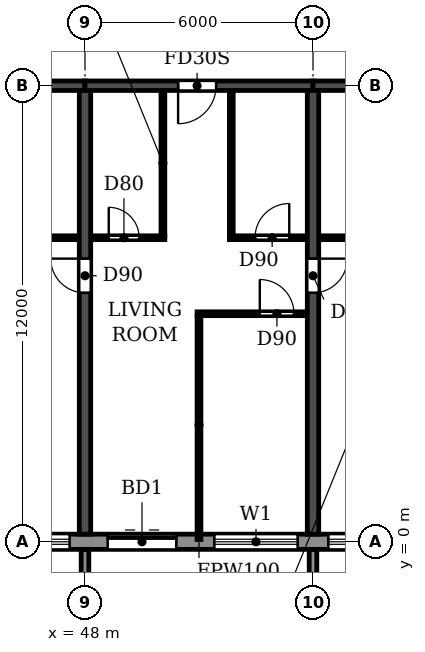
"""IFC4 building model, lengths in metres.
Left out: names, types, materials, properties, quantities, classifications, styles, units other than length and angle.
Written with IfcOpenShell. Run it as: python <this file> out.ifc"""

import sys

from ifc_helpers import new_model, si_unit, direction, frame, frame_2d, origin, place, context, subcontext, project, spatial, polyline, rectangle, outline, extrude, source, transform, mapped, element, fill, save


model = new_model("IFC4")
c1 = context("Model", 3, precision=1e-05, world=origin(), true_north=direction((0.0, 1.0)))
c2 = subcontext(c1, "Body", "Model", "MODEL_VIEW")
j1 = project(units=[si_unit("LENGTHUNIT", "METRE"), si_unit("PLANEANGLEUNIT", "RADIAN")], contexts=[c1])
p1 = place(None, origin())
s1 = spatial("IfcSite", under=j1, at=p1, CompositionType="ELEMENT")
p2 = place(p1, origin())
s2 = spatial("IfcBuilding", under=s1, at=p2, CompositionType="ELEMENT")
p3 = place(p2, frame((0.0, 0.0, 155.4)))
s3 = spatial("IfcBuildingStorey", under=s2, at=p3, CompositionType="ELEMENT", Elevation=155.4)
p4 = place(p3, frame((48.0, 0.2, 0.0), z_axis=(0.0, 0.0, 1.0), x_axis=(0.0, 1.0, 0.0)))
e1 = element("IfcWall", 1, at=p4, inside=s3, PredefinedType="SHEAR", context=c2, shape_type="SweptSolid", body=[
    extrude(rectangle(XDim=11.675, YDim=0.3, at=frame_2d((5.837, 0.0))), origin(), (0.0, 0.0, 1.0), 3.0),
])
p5 = place(p4, frame((6.35, 0.0, 0.0)))
e2 = element("IfcOpeningElement", 2, at=p5, cuts=e1, PredefinedType="OPENING", context=c2, shape_type="SweptSolid", body=[
    extrude(rectangle(XDim=0.9, YDim=2.1, at=frame_2d((0.45, 1.05))), frame((0.0, 0.16, 0.0), z_axis=(0.0, -1.0, 0.0), x_axis=(1.0, 0.0, 0.0)), (0.0, 0.0, 1.0), 0.32),
])
p6 = place(p3, frame((54.0, 0.2, 0.0), z_axis=(0.0, 0.0, 1.0), x_axis=(0.0, 1.0, 0.0)))
e3 = element("IfcWall", 3, at=p6, inside=s3, PredefinedType="SHEAR", context=c2, shape_type="SweptSolid", body=[
    extrude(rectangle(XDim=11.675, YDim=0.3, at=frame_2d((5.837, 0.0))), origin(), (0.0, 0.0, 1.0), 3.0),
])
p7 = place(p6, frame((6.35, 0.0, 0.0)))
e4 = element("IfcOpeningElement", 4, at=p7, cuts=e3, PredefinedType="OPENING", context=c2, shape_type="SweptSolid", body=[
    extrude(rectangle(XDim=0.9, YDim=2.1, at=frame_2d((0.45, 1.05))), frame((0.0, 0.16, 0.0), z_axis=(0.0, -1.0, 0.0), x_axis=(1.0, 0.0, 0.0)), (0.0, 0.0, 1.0), 0.32),
])
p8 = place(p3, frame((42.0, 12.0, 0.0), z_axis=(0.0, 0.0, 1.0), x_axis=(1.0, 0.0, 0.0)))
e5 = element("IfcWall", 5, at=p8, inside=s3, PredefinedType="SHEAR", context=c2, shape_type="SweptSolid", body=[
    extrude(rectangle(XDim=6.0, YDim=0.25, at=frame_2d((3.0, 0.0))), origin(), (0.0, 0.0, 1.0), 2.4),
])
p9 = place(p3, frame((48.0, 12.0, 0.0), z_axis=(0.0, 0.0, 1.0), x_axis=(1.0, 0.0, 0.0)))
e6 = element("IfcWall", 6, at=p9, inside=s3, PredefinedType="SHEAR", context=c2, shape_type="SweptSolid", body=[
    extrude(rectangle(XDim=6.0, YDim=0.25, at=frame_2d((3.0, 0.0))), origin(), (0.0, 0.0, 1.0), 2.4),
])
p10 = place(p9, frame((2.45, 0.0, 0.0)))
e7 = element("IfcOpeningElement", 7, at=p10, cuts=e6, PredefinedType="OPENING", context=c2, shape_type="SweptSolid", body=[
    extrude(rectangle(XDim=1.0, YDim=2.1, at=frame_2d((0.5, 1.05))), frame((0.0, 0.135, 0.0), z_axis=(0.0, -1.0, 0.0), x_axis=(1.0, 0.0, 0.0)), (0.0, 0.0, 1.0), 0.27),
])
p11 = place(p3, frame((54.0, 12.0, 0.0), z_axis=(0.0, 0.0, 1.0), x_axis=(1.0, 0.0, 0.0)))
e8 = element("IfcWall", 8, at=p11, inside=s3, PredefinedType="SHEAR", context=c2, shape_type="SweptSolid", body=[
    extrude(rectangle(XDim=6.0, YDim=0.25, at=frame_2d((3.0, 0.0))), origin(), (0.0, 0.0, 1.0), 2.4),
])
p12 = place(p3, frame((16.683, 0.0, 0.0), z_axis=(0.0, 0.0, 1.0), x_axis=(1.0, 0.0, 0.0)))
e9 = element("IfcWall", 9, at=p12, inside=s3, PredefinedType="STANDARD", context=c2, shape_type="SweptSolid", body=[
    extrude(rectangle(XDim=68.634, YDim=0.4, at=frame_2d((34.317, 0.0))), origin(), (0.0, 0.0, 1.0), 3.0),
])
p13 = place(p12, frame((1.717, 0.0, 0.9)))
e10 = element("IfcOpeningElement", 10, at=p13, cuts=e9, PredefinedType="OPENING", context=c2, shape_type="SweptSolid", body=[
    extrude(rectangle(XDim=2.2, YDim=1.5, at=frame_2d((1.1, 0.75))), frame((0.0, 0.21, 0.0), z_axis=(0.0, -1.0, 0.0), x_axis=(1.0, 0.0, 0.0)), (0.0, 0.0, 1.0), 0.42),
])
p14 = place(p12, frame((4.717, 0.0, 0.9)))
e11 = element("IfcOpeningElement", 11, at=p14, cuts=e9, PredefinedType="OPENING", context=c2, shape_type="SweptSolid", body=[
    extrude(rectangle(XDim=2.2, YDim=1.5, at=frame_2d((1.1, 0.75))), frame((0.0, 0.21, 0.0), z_axis=(0.0, -1.0, 0.0), x_axis=(1.0, 0.0, 0.0)), (0.0, 0.0, 1.0), 0.42),
])
p15 = place(p12, frame((7.917, 0.0, 0.0)))
e12 = element("IfcOpeningElement", 12, at=p15, cuts=e9, PredefinedType="OPENING", context=c2, shape_type="SweptSolid", body=[
    extrude(rectangle(XDim=1.8, YDim=2.4, at=frame_2d((0.9, 1.2))), frame((0.0, 0.21, 0.0), z_axis=(0.0, -1.0, 0.0), x_axis=(1.0, 0.0, 0.0)), (0.0, 0.0, 1.0), 0.42),
])
p16 = place(p12, frame((10.717, 0.0, 0.9)))
e13 = element("IfcOpeningElement", 13, at=p16, cuts=e9, PredefinedType="OPENING", context=c2, shape_type="SweptSolid", body=[
    extrude(rectangle(XDim=2.2, YDim=1.5, at=frame_2d((1.1, 0.75))), frame((0.0, 0.21, 0.0), z_axis=(0.0, -1.0, 0.0), x_axis=(1.0, 0.0, 0.0)), (0.0, 0.0, 1.0), 0.42),
])
p17 = place(p12, frame((13.717, 0.0, 0.9)))
e14 = element("IfcOpeningElement", 14, at=p17, cuts=e9, PredefinedType="OPENING", context=c2, shape_type="SweptSolid", body=[
    extrude(rectangle(XDim=2.2, YDim=1.5, at=frame_2d((1.1, 0.75))), frame((0.0, 0.21, 0.0), z_axis=(0.0, -1.0, 0.0), x_axis=(1.0, 0.0, 0.0)), (0.0, 0.0, 1.0), 0.42),
])
p18 = place(p12, frame((16.717, 0.0, 0.9)))
e15 = element("IfcOpeningElement", 15, at=p18, cuts=e9, PredefinedType="OPENING", context=c2, shape_type="SweptSolid", body=[
    extrude(rectangle(XDim=2.2, YDim=1.5, at=frame_2d((1.1, 0.75))), frame((0.0, 0.21, 0.0), z_axis=(0.0, -1.0, 0.0), x_axis=(1.0, 0.0, 0.0)), (0.0, 0.0, 1.0), 0.42),
])
p19 = place(p12, frame((19.717, 0.0, 0.9)))
e16 = element("IfcOpeningElement", 16, at=p19, cuts=e9, PredefinedType="OPENING", context=c2, shape_type="SweptSolid", body=[
    extrude(rectangle(XDim=2.2, YDim=1.5, at=frame_2d((1.1, 0.75))), frame((0.0, 0.21, 0.0), z_axis=(0.0, -1.0, 0.0), x_axis=(1.0, 0.0, 0.0)), (0.0, 0.0, 1.0), 0.42),
])
p20 = place(p12, frame((22.917, 0.0, 0.0)))
e17 = element("IfcOpeningElement", 17, at=p20, cuts=e9, PredefinedType="OPENING", context=c2, shape_type="SweptSolid", body=[
    extrude(rectangle(XDim=1.8, YDim=2.4, at=frame_2d((0.9, 1.2))), frame((0.0, 0.21, 0.0), z_axis=(0.0, -1.0, 0.0), x_axis=(1.0, 0.0, 0.0)), (0.0, 0.0, 1.0), 0.42),
])
p21 = place(p12, frame((25.717, 0.0, 0.9)))
e18 = element("IfcOpeningElement", 18, at=p21, cuts=e9, PredefinedType="OPENING", context=c2, shape_type="SweptSolid", body=[
    extrude(rectangle(XDim=2.2, YDim=1.5, at=frame_2d((1.1, 0.75))), frame((0.0, 0.21, 0.0), z_axis=(0.0, -1.0, 0.0), x_axis=(1.0, 0.0, 0.0)), (0.0, 0.0, 1.0), 0.42),
])
p22 = place(p12, frame((28.717, 0.0, 0.9)))
e19 = element("IfcOpeningElement", 19, at=p22, cuts=e9, PredefinedType="OPENING", context=c2, shape_type="SweptSolid", body=[
    extrude(rectangle(XDim=2.2, YDim=1.5, at=frame_2d((1.1, 0.75))), frame((0.0, 0.21, 0.0), z_axis=(0.0, -1.0, 0.0), x_axis=(1.0, 0.0, 0.0)), (0.0, 0.0, 1.0), 0.42),
])
p23 = place(p12, frame((31.917, 0.0, 0.0)))
e20 = element("IfcOpeningElement", 20, at=p23, cuts=e9, PredefinedType="OPENING", context=c2, shape_type="SweptSolid", body=[
    extrude(rectangle(XDim=1.8, YDim=2.4, at=frame_2d((0.9, 1.2))), frame((0.0, 0.21, 0.0), z_axis=(0.0, -1.0, 0.0), x_axis=(1.0, 0.0, 0.0)), (0.0, 0.0, 1.0), 0.42),
])
p24 = place(p12, frame((34.717, 0.0, 0.9)))
e21 = element("IfcOpeningElement", 21, at=p24, cuts=e9, PredefinedType="OPENING", context=c2, shape_type="SweptSolid", body=[
    extrude(rectangle(XDim=2.2, YDim=1.5, at=frame_2d((1.1, 0.75))), frame((0.0, 0.21, 0.0), z_axis=(0.0, -1.0, 0.0), x_axis=(1.0, 0.0, 0.0)), (0.0, 0.0, 1.0), 0.42),
])
p25 = place(p12, frame((37.717, 0.0, 0.9)))
e22 = element("IfcOpeningElement", 22, at=p25, cuts=e9, PredefinedType="OPENING", context=c2, shape_type="SweptSolid", body=[
    extrude(rectangle(XDim=2.2, YDim=1.5, at=frame_2d((1.1, 0.75))), frame((0.0, 0.21, 0.0), z_axis=(0.0, -1.0, 0.0), x_axis=(1.0, 0.0, 0.0)), (0.0, 0.0, 1.0), 0.42),
])
p26 = place(p12, frame((40.717, 0.0, 0.9)))
e23 = element("IfcOpeningElement", 23, at=p26, cuts=e9, PredefinedType="OPENING", context=c2, shape_type="SweptSolid", body=[
    extrude(rectangle(XDim=2.2, YDim=1.5, at=frame_2d((1.1, 0.75))), frame((0.0, 0.21, 0.0), z_axis=(0.0, -1.0, 0.0), x_axis=(1.0, 0.0, 0.0)), (0.0, 0.0, 1.0), 0.42),
])
p27 = place(p12, frame((43.717, 0.0, 0.9)))
e24 = element("IfcOpeningElement", 24, at=p27, cuts=e9, PredefinedType="OPENING", context=c2, shape_type="SweptSolid", body=[
    extrude(rectangle(XDim=2.2, YDim=1.5, at=frame_2d((1.1, 0.75))), frame((0.0, 0.21, 0.0), z_axis=(0.0, -1.0, 0.0), x_axis=(1.0, 0.0, 0.0)), (0.0, 0.0, 1.0), 0.42),
])
p28 = place(p12, frame((46.917, 0.0, 0.0)))
e25 = element("IfcOpeningElement", 25, at=p28, cuts=e9, PredefinedType="OPENING", context=c2, shape_type="SweptSolid", body=[
    extrude(rectangle(XDim=1.8, YDim=2.4, at=frame_2d((0.9, 1.2))), frame((0.0, 0.21, 0.0), z_axis=(0.0, -1.0, 0.0), x_axis=(1.0, 0.0, 0.0)), (0.0, 0.0, 1.0), 0.42),
])
p29 = place(p12, frame((49.717, 0.0, 0.9)))
e26 = element("IfcOpeningElement", 26, at=p29, cuts=e9, PredefinedType="OPENING", context=c2, shape_type="SweptSolid", body=[
    extrude(rectangle(XDim=2.2, YDim=1.5, at=frame_2d((1.1, 0.75))), frame((0.0, 0.21, 0.0), z_axis=(0.0, -1.0, 0.0), x_axis=(1.0, 0.0, 0.0)), (0.0, 0.0, 1.0), 0.42),
])
p30 = place(p12, frame((52.717, 0.0, 0.9)))
e27 = element("IfcOpeningElement", 27, at=p30, cuts=e9, PredefinedType="OPENING", context=c2, shape_type="SweptSolid", body=[
    extrude(rectangle(XDim=2.2, YDim=1.5, at=frame_2d((1.1, 0.75))), frame((0.0, 0.21, 0.0), z_axis=(0.0, -1.0, 0.0), x_axis=(1.0, 0.0, 0.0)), (0.0, 0.0, 1.0), 0.42),
])
p31 = place(p12, frame((55.717, 0.0, 0.9)))
e28 = element("IfcOpeningElement", 28, at=p31, cuts=e9, PredefinedType="OPENING", context=c2, shape_type="SweptSolid", body=[
    extrude(rectangle(XDim=2.2, YDim=1.5, at=frame_2d((1.1, 0.75))), frame((0.0, 0.21, 0.0), z_axis=(0.0, -1.0, 0.0), x_axis=(1.0, 0.0, 0.0)), (0.0, 0.0, 1.0), 0.42),
])
p32 = place(p12, frame((58.917, 0.0, 0.0)))
e29 = element("IfcOpeningElement", 29, at=p32, cuts=e9, PredefinedType="OPENING", context=c2, shape_type="SweptSolid", body=[
    extrude(rectangle(XDim=1.8, YDim=2.4, at=frame_2d((0.9, 1.2))), frame((0.0, 0.21, 0.0), z_axis=(0.0, -1.0, 0.0), x_axis=(1.0, 0.0, 0.0)), (0.0, 0.0, 1.0), 0.42),
])
p33 = place(p12, frame((61.717, 0.0, 0.9)))
e30 = element("IfcOpeningElement", 30, at=p33, cuts=e9, PredefinedType="OPENING", context=c2, shape_type="SweptSolid", body=[
    extrude(rectangle(XDim=2.2, YDim=1.5, at=frame_2d((1.1, 0.75))), frame((0.0, 0.21, 0.0), z_axis=(0.0, -1.0, 0.0), x_axis=(1.0, 0.0, 0.0)), (0.0, 0.0, 1.0), 0.42),
])
p34 = place(p12, frame((64.717, 0.0, 0.9)))
e31 = element("IfcOpeningElement", 31, at=p34, cuts=e9, PredefinedType="OPENING", context=c2, shape_type="SweptSolid", body=[
    extrude(rectangle(XDim=2.2, YDim=1.5, at=frame_2d((1.1, 0.75))), frame((0.0, 0.21, 0.0), z_axis=(0.0, -1.0, 0.0), x_axis=(1.0, 0.0, 0.0)), (0.0, 0.0, 1.0), 0.42),
])
m1 = source(origin(), c2, "Body", "SweptSolid", [
    extrude(outline(polyline([(0.0, 0.0), (0.2, 0.0), (0.2, 1.65), (0.0, 1.65), (0.0, 0.0)])), origin(), (0.0, 0.0, 1.0), 3.1),
])
for number, where in (
    (32, (47.9, -1.85, 0.0)),
    (33, (53.9, -1.85, 0.0)),
):
    element("IfcWall", number, at=place(p3, frame(where)), inside=s3, PredefinedType="STANDARD", context=c2, shape_type="MappedRepresentation", body=[
        mapped(m1, transform((0.0, 0.0, 0.0))),
    ])
p35 = place(p3, frame((50.95, 6.0, 0.0), z_axis=(0.0, 0.0, 1.0), x_axis=(1.0, 0.0, 0.0)))
e34 = element("IfcWall", 34, at=p35, inside=s3, PredefinedType="PARTITIONING", context=c2, shape_type="SweptSolid", body=[
    extrude(rectangle(XDim=2.89, YDim=0.1, at=frame_2d((1.445, 0.0))), origin(), (0.0, 0.0, 1.0), 3.0),
])
p36 = place(p35, frame((1.65, 0.0, 0.0)))
e35 = element("IfcOpeningElement", 35, at=p36, cuts=e34, PredefinedType="OPENING", context=c2, shape_type="SweptSolid", body=[
    extrude(rectangle(XDim=0.9, YDim=2.1, at=frame_2d((0.45, 1.05))), frame((0.0, 0.06, 0.0), z_axis=(0.0, -1.0, 0.0), x_axis=(1.0, 0.0, 0.0)), (0.0, 0.0, 1.0), 0.12),
])
p37 = place(p3, frame((45.1, 8.0, 0.0), z_axis=(0.0, 0.0, 1.0), x_axis=(1.0, 0.0, 0.0)))
e36 = element("IfcWall", 36, at=p37, inside=s3, PredefinedType="PARTITIONING", context=c2, shape_type="SweptSolid", body=[
    extrude(rectangle(XDim=2.74, YDim=0.1, at=frame_2d((1.37, 0.0))), origin(), (0.0, 0.0, 1.0), 3.0),
])
p38 = place(p37, frame((1.0, 0.0, 0.0)))
e37 = element("IfcOpeningElement", 37, at=p38, cuts=e36, PredefinedType="OPENING", context=c2, shape_type="SweptSolid", body=[
    extrude(rectangle(XDim=0.8, YDim=2.1, at=frame_2d((0.4, 1.05))), frame((0.0, 0.06, 0.0), z_axis=(0.0, -1.0, 0.0), x_axis=(1.0, 0.0, 0.0)), (0.0, 0.0, 1.0), 0.12),
])
p39 = place(p3, frame((48.16, 8.0, 0.0), z_axis=(0.0, 0.0, 1.0), x_axis=(1.0, 0.0, 0.0)))
e38 = element("IfcWall", 38, at=p39, inside=s3, PredefinedType="PARTITIONING", context=c2, shape_type="SweptSolid", body=[
    extrude(rectangle(XDim=1.94, YDim=0.1, at=frame_2d((0.97, 0.0))), origin(), (0.0, 0.0, 1.0), 3.0),
])
p40 = place(p39, frame((0.465, 0.0, 0.0)))
e39 = element("IfcOpeningElement", 39, at=p40, cuts=e38, PredefinedType="OPENING", context=c2, shape_type="SweptSolid", body=[
    extrude(rectangle(XDim=0.8, YDim=2.1, at=frame_2d((0.4, 1.05))), frame((0.0, 0.06, 0.0), z_axis=(0.0, -1.0, 0.0), x_axis=(1.0, 0.0, 0.0)), (0.0, 0.0, 1.0), 0.12),
])
p41 = place(p3, frame((51.8, 8.0, 0.0), z_axis=(0.0, 0.0, 1.0), x_axis=(1.0, 0.0, 0.0)))
e40 = element("IfcWall", 40, at=p41, inside=s3, PredefinedType="PARTITIONING", context=c2, shape_type="SweptSolid", body=[
    extrude(rectangle(XDim=2.04, YDim=0.1, at=frame_2d((1.02, 0.0))), origin(), (0.0, 0.0, 1.0), 3.0),
])
p42 = place(p41, frame((0.675, 0.0, 0.0)))
e41 = element("IfcOpeningElement", 41, at=p42, cuts=e40, PredefinedType="OPENING", context=c2, shape_type="SweptSolid", body=[
    extrude(rectangle(XDim=0.9, YDim=2.1, at=frame_2d((0.45, 1.05))), frame((0.0, 0.06, 0.0), z_axis=(0.0, -1.0, 0.0), x_axis=(1.0, 0.0, 0.0)), (0.0, 0.0, 1.0), 0.12),
])
p43 = place(p3, frame((54.16, 8.0, 0.0), z_axis=(0.0, 0.0, 1.0), x_axis=(1.0, 0.0, 0.0)))
e42 = element("IfcWall", 42, at=p43, inside=s3, PredefinedType="PARTITIONING", context=c2, shape_type="SweptSolid", body=[
    extrude(rectangle(XDim=2.94, YDim=0.1, at=frame_2d((1.47, 0.0))), origin(), (0.0, 0.0, 1.0), 3.0),
])
p44 = place(p43, frame((0.94, 0.0, 0.0)))
e43 = element("IfcOpeningElement", 43, at=p44, cuts=e42, PredefinedType="OPENING", context=c2, shape_type="SweptSolid", body=[
    extrude(rectangle(XDim=0.8, YDim=2.1, at=frame_2d((0.4, 1.05))), frame((0.0, 0.06, 0.0), z_axis=(0.0, -1.0, 0.0), x_axis=(1.0, 0.0, 0.0)), (0.0, 0.0, 1.0), 0.12),
])
p45 = place(p3, frame((50.05, 8.05, 0.0), z_axis=(0.0, 0.0, 1.0), x_axis=(0.0, 1.0, 0.0)))
e44 = element("IfcWall", 44, at=p45, inside=s3, PredefinedType="PARTITIONING", context=c2, shape_type="SweptSolid", body=[
    extrude(rectangle(XDim=3.815, YDim=0.1, at=frame_2d((1.907, 0.0))), origin(), (0.0, 0.0, 1.0), 3.0),
])
p46 = place(p3, frame((51.0, 0.06, 0.0), z_axis=(0.0, 0.0, 1.0), x_axis=(0.0, 1.0, 0.0)))
e45 = element("IfcWall", 45, at=p46, inside=s3, PredefinedType="PARTITIONING", context=c2, shape_type="SweptSolid", body=[
    extrude(rectangle(XDim=5.89, YDim=0.1, at=frame_2d((2.945, 0.0))), origin(), (0.0, 0.0, 1.0), 3.0),
])
p47 = place(p3, frame((51.85, 8.05, 0.0), z_axis=(0.0, 0.0, 1.0), x_axis=(0.0, 1.0, 0.0)))
e46 = element("IfcWall", 46, at=p47, inside=s3, PredefinedType="PARTITIONING", context=c2, shape_type="SweptSolid", body=[
    extrude(rectangle(XDim=3.815, YDim=0.1, at=frame_2d((1.907, 0.0))), origin(), (0.0, 0.0, 1.0), 3.0),
])
p48 = place(p22, origin())
e47 = element("IfcWindow", 47, at=p48, inside=s3, PartitioningType="DOUBLE_PANEL_HORIZONTAL", PredefinedType="WINDOW", context=c2, shape_type="SweptSolid", body=[
    extrude(rectangle(XDim=2.2, YDim=1.5, at=frame_2d((1.1, 0.75))), frame((0.0, 0.03, 0.0), z_axis=(0.0, -1.0, 0.0), x_axis=(1.0, 0.0, 0.0)), (0.0, 0.0, 1.0), 0.06),
])
fill(e19, e47)
p49 = place(p23, origin())
e48 = element("IfcDoor", 48, at=p49, inside=s3, OperationType="DOUBLE_DOOR_SLIDING", PredefinedType="DOOR", context=c2, shape_type="SweptSolid", body=[
    extrude(rectangle(XDim=1.8, YDim=2.4, at=frame_2d((0.9, 1.2))), frame((0.0, 0.025, 0.0), z_axis=(0.0, -1.0, 0.0), x_axis=(1.0, 0.0, 0.0)), (0.0, 0.0, 1.0), 0.05),
])
fill(e20, e48)
p50 = place(p24, origin())
e49 = element("IfcWindow", 49, at=p50, inside=s3, PartitioningType="DOUBLE_PANEL_HORIZONTAL", PredefinedType="WINDOW", context=c2, shape_type="SweptSolid", body=[
    extrude(rectangle(XDim=2.2, YDim=1.5, at=frame_2d((1.1, 0.75))), frame((0.0, 0.03, 0.0), z_axis=(0.0, -1.0, 0.0), x_axis=(1.0, 0.0, 0.0)), (0.0, 0.0, 1.0), 0.06),
])
fill(e21, e49)
p51 = place(p25, origin())
e50 = element("IfcWindow", 50, at=p51, inside=s3, PartitioningType="DOUBLE_PANEL_HORIZONTAL", PredefinedType="WINDOW", context=c2, shape_type="SweptSolid", body=[
    extrude(rectangle(XDim=2.2, YDim=1.5, at=frame_2d((1.1, 0.75))), frame((0.0, 0.03, 0.0), z_axis=(0.0, -1.0, 0.0), x_axis=(1.0, 0.0, 0.0)), (0.0, 0.0, 1.0), 0.06),
])
fill(e22, e50)
p52 = place(p5, origin())
e51 = element("IfcDoor", 51, at=p52, inside=s3, OperationType="SINGLE_SWING_RIGHT", PredefinedType="DOOR", context=c2, shape_type="SweptSolid", body=[
    extrude(rectangle(XDim=0.9, YDim=2.1, at=frame_2d((0.45, 1.05))), frame((0.0, 0.025, 0.0), z_axis=(0.0, -1.0, 0.0), x_axis=(1.0, 0.0, 0.0)), (0.0, 0.0, 1.0), 0.05),
])
fill(e2, e51)
p53 = place(p40, origin())
e52 = element("IfcDoor", 52, at=p53, inside=s3, OperationType="SINGLE_SWING_LEFT", PredefinedType="DOOR", context=c2, shape_type="SweptSolid", body=[
    extrude(rectangle(XDim=0.8, YDim=2.1, at=frame_2d((0.4, 1.05))), frame((0.0, 0.025, 0.0), z_axis=(0.0, -1.0, 0.0), x_axis=(1.0, 0.0, 0.0)), (0.0, 0.0, 1.0), 0.05),
])
fill(e39, e52)
p54 = place(p10, frame((1.0, 0.0, 0.0), z_axis=(0.0, 0.0, 1.0), x_axis=(-1.0, 0.0, 0.0)))
e53 = element("IfcDoor", 53, at=p54, inside=s3, OperationType="SINGLE_SWING_RIGHT", PredefinedType="DOOR", context=c2, shape_type="SweptSolid", body=[
    extrude(rectangle(XDim=1.0, YDim=2.1, at=frame_2d((0.5, 1.05))), frame((0.0, 0.025, 0.0), z_axis=(0.0, -1.0, 0.0), x_axis=(1.0, 0.0, 0.0)), (0.0, 0.0, 1.0), 0.05),
])
fill(e7, e53)
p55 = place(p42, origin())
e54 = element("IfcDoor", 54, at=p55, inside=s3, OperationType="SINGLE_SWING_RIGHT", PredefinedType="DOOR", context=c2, shape_type="SweptSolid", body=[
    extrude(rectangle(XDim=0.9, YDim=2.1, at=frame_2d((0.45, 1.05))), frame((0.0, 0.025, 0.0), z_axis=(0.0, -1.0, 0.0), x_axis=(1.0, 0.0, 0.0)), (0.0, 0.0, 1.0), 0.05),
])
fill(e41, e54)
p56 = place(p36, origin())
e55 = element("IfcDoor", 55, at=p56, inside=s3, OperationType="SINGLE_SWING_LEFT", PredefinedType="DOOR", context=c2, shape_type="SweptSolid", body=[
    extrude(rectangle(XDim=0.9, YDim=2.1, at=frame_2d((0.45, 1.05))), frame((0.0, 0.025, 0.0), z_axis=(0.0, -1.0, 0.0), x_axis=(1.0, 0.0, 0.0)), (0.0, 0.0, 1.0), 0.05),
])
fill(e35, e55)
p57 = place(p7, frame((0.9, 0.0, 0.0), z_axis=(0.0, 0.0, 1.0), x_axis=(-1.0, 0.0, 0.0)))
e56 = element("IfcDoor", 56, at=p57, inside=s3, OperationType="SINGLE_SWING_LEFT", PredefinedType="DOOR", context=c2, shape_type="SweptSolid", body=[
    extrude(rectangle(XDim=0.9, YDim=2.1, at=frame_2d((0.45, 1.05))), frame((0.0, 0.025, 0.0), z_axis=(0.0, -1.0, 0.0), x_axis=(1.0, 0.0, 0.0)), (0.0, 0.0, 1.0), 0.05),
])
fill(e4, e56)
save(model, sys.argv[1])
